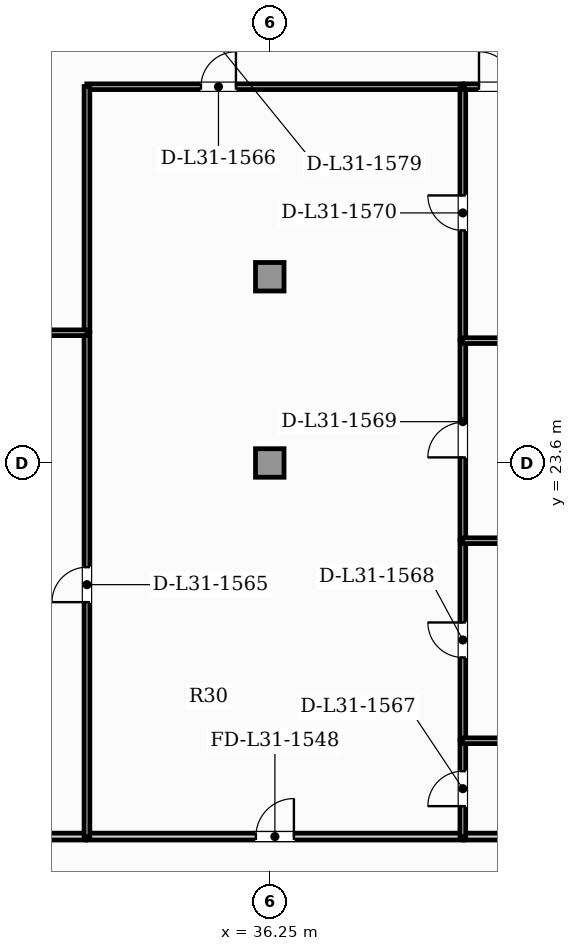
"""IFC4 building model, lengths in metres.
Left out: names, types, materials, properties, quantities, classifications, styles, units other than length and angle.
Written with IfcOpenShell. Run it as: python <this file> out.ifc"""

import sys

from ifc_helpers import new_model, si_unit, direction, frame, frame_2d, origin, origin_2d, place, context, subcontext, project, spatial, rectangle, extrude, element, fill, save


model = new_model("IFC4")
c1 = context("Model", 3, precision=1e-05, world=origin(), true_north=direction((0.0, 1.0)))
c2 = subcontext(c1, "Body", "Model", "MODEL_VIEW")
j1 = project(units=[si_unit("LENGTHUNIT", "METRE"), si_unit("PLANEANGLEUNIT", "RADIAN")], contexts=[c1])
p1 = place(None, origin())
s1 = spatial("IfcSite", under=j1, at=p1, CompositionType="ELEMENT")
p2 = place(p1, origin())
s2 = spatial("IfcBuilding", under=s1, at=p2, CompositionType="ELEMENT")
p3 = place(p2, frame((0.0, 0.0, 127.25)))
s3 = spatial("IfcBuildingStorey", under=s2, at=p3, CompositionType="ELEMENT", Elevation=127.25)
for number, where, z_axis, x_axis in (
    (1, (36.25, 23.6, 0.0), (0.0, 0.0, 1.0), (1.0, 0.0, 0.0)),
    (2, (36.25, 28.5, 0.0), (0.0, 0.0, 1.0), (1.0, 0.0, 0.0)),
):
    element("IfcColumn", number, at=place(p3, frame(where, z_axis=z_axis, x_axis=x_axis)), inside=s3, PredefinedType="COLUMN", context=c2, shape_type="SweptSolid", body=[
        extrude(rectangle(XDim=0.75, YDim=0.75, at=origin_2d()), origin(), (0.0, 0.0, 1.0), 3.85),
    ])
p4 = place(p3, frame((31.435, 13.77, 0.0), z_axis=(0.0, 0.0, 1.0), x_axis=(1.0, 0.0, 0.0)))
e3 = element("IfcWall", 3, at=p4, inside=s3, PredefinedType="PARTITIONING", context=c2, shape_type="SweptSolid", body=[
    extrude(rectangle(XDim=9.9, YDim=0.18, at=frame_2d((4.95, 0.0))), origin(), (0.0, 0.0, 1.0), 3.6),
])
p5 = place(p4, frame((4.45, 0.0, 0.0)))
e4 = element("IfcOpeningElement", 4, at=p5, cuts=e3, PredefinedType="OPENING", context=c2, shape_type="SweptSolid", body=[
    extrude(rectangle(XDim=1.0, YDim=2.15, at=frame_2d((0.5, 1.075))), frame((0.0, 0.1, 0.0), z_axis=(0.0, -1.0, 0.0), x_axis=(1.0, 0.0, 0.0)), (0.0, 0.0, 1.0), 0.2),
])
p6 = place(p3, frame((26.095, 13.77, 0.0), z_axis=(0.0, 0.0, 1.0), x_axis=(1.0, 0.0, 0.0)))
e5 = element("IfcWall", 5, at=p6, inside=s3, PredefinedType="PARTITIONING", context=c2, shape_type="SweptSolid", body=[
    extrude(rectangle(XDim=5.31, YDim=0.18, at=frame_2d((2.655, 0.0))), origin(), (0.0, 0.0, 1.0), 3.6),
])
p7 = place(p6, frame((2.155, 0.0, 0.0)))
e6 = element("IfcOpeningElement", 6, at=p7, cuts=e5, PredefinedType="OPENING", context=c2, shape_type="SweptSolid", body=[
    extrude(rectangle(XDim=1.0, YDim=2.15, at=frame_2d((0.5, 1.075))), frame((0.0, 0.1, 0.0), z_axis=(0.0, -1.0, 0.0), x_axis=(1.0, 0.0, 0.0)), (0.0, 0.0, 1.0), 0.2),
])
p8 = place(p3, frame((41.365, 13.77, 0.0), z_axis=(0.0, 0.0, 1.0), x_axis=(1.0, 0.0, 0.0)))
e7 = element("IfcWall", 7, at=p8, inside=s3, PredefinedType="PARTITIONING", context=c2, shape_type="SweptSolid", body=[
    extrude(rectangle(XDim=4.25, YDim=0.18, at=frame_2d((2.125, 0.0))), origin(), (0.0, 0.0, 1.0), 3.6),
])
p9 = place(p3, frame((31.44, 13.765, 0.0), z_axis=(0.0, 0.0, 1.0), x_axis=(0.0, 1.0, 0.0)))
e8 = element("IfcWall", 8, at=p9, inside=s3, PredefinedType="PARTITIONING", context=c2, shape_type="SweptSolid", body=[
    extrude(rectangle(XDim=13.267, YDim=0.15, at=frame_2d((6.634, 0.0))), origin(), (0.0, 0.0, 1.0), 3.6),
])
p10 = place(p9, frame((6.173, 0.0, 0.0)))
e9 = element("IfcOpeningElement", 9, at=p10, cuts=e8, PredefinedType="OPENING", context=c2, shape_type="SweptSolid", body=[
    extrude(rectangle(XDim=0.92, YDim=2.1, at=frame_2d((0.46, 1.05))), frame((0.0, 0.085, 0.0), z_axis=(0.0, -1.0, 0.0), x_axis=(1.0, 0.0, 0.0)), (0.0, 0.0, 1.0), 0.17),
])
p11 = place(p3, frame((31.435, 33.5, 0.0), z_axis=(0.0, 0.0, 1.0), x_axis=(1.0, 0.0, 0.0)))
e10 = element("IfcWall", 10, at=p11, inside=s3, PredefinedType="PARTITIONING", context=c2, shape_type="SweptSolid", body=[
    extrude(rectangle(XDim=9.9, YDim=0.15, at=frame_2d((4.95, 0.0))), origin(), (0.0, 0.0, 1.0), 3.6),
])
p12 = place(p11, frame((3.005, 0.0, 0.0)))
e11 = element("IfcOpeningElement", 11, at=p12, cuts=e10, PredefinedType="OPENING", context=c2, shape_type="SweptSolid", body=[
    extrude(rectangle(XDim=0.92, YDim=2.1, at=frame_2d((0.46, 1.05))), frame((0.0, 0.085, 0.0), z_axis=(0.0, -1.0, 0.0), x_axis=(1.0, 0.0, 0.0)), (0.0, 0.0, 1.0), 0.17),
])
p13 = place(p3, frame((31.44, 27.062, 0.0), z_axis=(0.0, 0.0, 1.0), x_axis=(0.0, 1.0, 0.0)))
e12 = element("IfcWall", 12, at=p13, inside=s3, PredefinedType="PARTITIONING", context=c2, shape_type="SweptSolid", body=[
    extrude(rectangle(XDim=6.443, YDim=0.15, at=frame_2d((3.221, 0.0))), origin(), (0.0, 0.0, 1.0), 3.6),
])
p14 = place(p3, frame((41.33, 13.765, 0.0), z_axis=(0.0, 0.0, 1.0), x_axis=(0.0, 1.0, 0.0)))
e13 = element("IfcWall", 13, at=p14, inside=s3, PredefinedType="PARTITIONING", context=c2, shape_type="SweptSolid", body=[
    extrude(rectangle(XDim=2.531, YDim=0.15, at=frame_2d((1.266, 0.0))), origin(), (0.0, 0.0, 1.0), 3.6),
])
p15 = place(p14, frame((0.806, 0.0, 0.0)))
e14 = element("IfcOpeningElement", 14, at=p15, cuts=e13, PredefinedType="OPENING", context=c2, shape_type="SweptSolid", body=[
    extrude(rectangle(XDim=0.92, YDim=2.1, at=frame_2d((0.46, 1.05))), frame((0.0, 0.085, 0.0), z_axis=(0.0, -1.0, 0.0), x_axis=(1.0, 0.0, 0.0)), (0.0, 0.0, 1.0), 0.17),
])
p16 = place(p3, frame((41.33, 16.326, 0.0), z_axis=(0.0, 0.0, 1.0), x_axis=(0.0, 1.0, 0.0)))
e15 = element("IfcWall", 15, at=p16, inside=s3, PredefinedType="PARTITIONING", context=c2, shape_type="SweptSolid", body=[
    extrude(rectangle(XDim=5.234, YDim=0.15, at=frame_2d((2.617, 0.0))), origin(), (0.0, 0.0, 1.0), 3.6),
])
p17 = place(p16, frame((2.157, 0.0, 0.0)))
e16 = element("IfcOpeningElement", 16, at=p17, cuts=e15, PredefinedType="OPENING", context=c2, shape_type="SweptSolid", body=[
    extrude(rectangle(XDim=0.92, YDim=2.1, at=frame_2d((0.46, 1.05))), frame((0.0, 0.085, 0.0), z_axis=(0.0, -1.0, 0.0), x_axis=(1.0, 0.0, 0.0)), (0.0, 0.0, 1.0), 0.17),
])
p18 = place(p3, frame((41.33, 21.59, 0.0), z_axis=(0.0, 0.0, 1.0), x_axis=(0.0, 1.0, 0.0)))
e17 = element("IfcWall", 17, at=p18, inside=s3, PredefinedType="PARTITIONING", context=c2, shape_type="SweptSolid", body=[
    extrude(rectangle(XDim=5.234, YDim=0.15, at=frame_2d((2.617, 0.0))), origin(), (0.0, 0.0, 1.0), 3.6),
])
p19 = place(p18, frame((2.157, 0.0, 0.0)))
e18 = element("IfcOpeningElement", 18, at=p19, cuts=e17, PredefinedType="OPENING", context=c2, shape_type="SweptSolid", body=[
    extrude(rectangle(XDim=0.92, YDim=2.1, at=frame_2d((0.46, 1.05))), frame((0.0, 0.085, 0.0), z_axis=(0.0, -1.0, 0.0), x_axis=(1.0, 0.0, 0.0)), (0.0, 0.0, 1.0), 0.17),
])
p20 = place(p3, frame((41.33, 26.854, 0.0), z_axis=(0.0, 0.0, 1.0), x_axis=(0.0, 1.0, 0.0)))
e19 = element("IfcWall", 19, at=p20, inside=s3, PredefinedType="PARTITIONING", context=c2, shape_type="SweptSolid", body=[
    extrude(rectangle(XDim=6.651, YDim=0.15, at=frame_2d((3.325, 0.0))), origin(), (0.0, 0.0, 1.0), 3.6),
])
p21 = place(p20, frame((2.865, 0.0, 0.0)))
e20 = element("IfcOpeningElement", 20, at=p21, cuts=e19, PredefinedType="OPENING", context=c2, shape_type="SweptSolid", body=[
    extrude(rectangle(XDim=0.92, YDim=2.1, at=frame_2d((0.46, 1.05))), frame((0.0, 0.085, 0.0), z_axis=(0.0, -1.0, 0.0), x_axis=(1.0, 0.0, 0.0)), (0.0, 0.0, 1.0), 0.17),
])
p22 = place(p3, frame((26.055, 27.027, 0.0), z_axis=(0.0, 0.0, 1.0), x_axis=(1.0, 0.0, 0.0)))
e21 = element("IfcWall", 21, at=p22, inside=s3, PredefinedType="PARTITIONING", context=c2, shape_type="SweptSolid", body=[
    extrude(rectangle(XDim=5.39, YDim=0.15, at=frame_2d((2.695, 0.0))), origin(), (0.0, 0.0, 1.0), 3.6),
])
p23 = place(p22, frame((0.618, 0.0, 0.0)))
e22 = element("IfcOpeningElement", 22, at=p23, cuts=e21, PredefinedType="OPENING", context=c2, shape_type="SweptSolid", body=[
    extrude(rectangle(XDim=0.92, YDim=2.1, at=frame_2d((0.46, 1.05))), frame((0.0, 0.085, 0.0), z_axis=(0.0, -1.0, 0.0), x_axis=(1.0, 0.0, 0.0)), (0.0, 0.0, 1.0), 0.17),
])
p24 = place(p3, frame((41.365, 33.5, 0.0), z_axis=(0.0, 0.0, 1.0), x_axis=(1.0, 0.0, 0.0)))
e23 = element("IfcWall", 23, at=p24, inside=s3, PredefinedType="PARTITIONING", context=c2, shape_type="SweptSolid", body=[
    extrude(rectangle(XDim=4.25, YDim=0.15, at=frame_2d((2.125, 0.0))), origin(), (0.0, 0.0, 1.0), 3.6),
])
p25 = place(p24, frame((0.39, 0.0, 0.0)))
e24 = element("IfcOpeningElement", 24, at=p25, cuts=e23, PredefinedType="OPENING", context=c2, shape_type="SweptSolid", body=[
    extrude(rectangle(XDim=0.92, YDim=2.1, at=frame_2d((0.46, 1.05))), frame((0.0, 0.085, 0.0), z_axis=(0.0, -1.0, 0.0), x_axis=(1.0, 0.0, 0.0)), (0.0, 0.0, 1.0), 0.17),
])
for number, where, z_axis, x_axis in (
    (25, (41.325, 16.292, 0.0), (0.0, 0.0, 1.0), (1.0, 0.0, 0.0)),
    (26, (41.325, 21.555, 0.0), (0.0, 0.0, 1.0), (1.0, 0.0, 0.0)),
    (27, (41.325, 26.819, 0.0), (0.0, 0.0, 1.0), (1.0, 0.0, 0.0)),
):
    element("IfcWall", number, at=place(p3, frame(where, z_axis=z_axis, x_axis=x_axis)), inside=s3, PredefinedType="PARTITIONING", context=c2, shape_type="SweptSolid", body=[
        extrude(rectangle(XDim=4.29, YDim=0.15, at=frame_2d((2.145, 0.0))), origin(), (0.0, 0.0, 1.0), 3.6),
    ])
p26 = place(p5, origin())
e28 = element("IfcDoor", 28, at=p26, inside=s3, OperationType="SINGLE_SWING_RIGHT", PredefinedType="DOOR", context=c2, shape_type="SweptSolid", body=[
    extrude(rectangle(XDim=1.0, YDim=2.15, at=frame_2d((0.5, 1.075))), frame((0.0, 0.025, 0.0), z_axis=(0.0, -1.0, 0.0), x_axis=(1.0, 0.0, 0.0)), (0.0, 0.0, 1.0), 0.05),
])
fill(e4, e28)
p27 = place(p10, origin())
e29 = element("IfcDoor", 29, at=p27, inside=s3, OperationType="SINGLE_SWING_LEFT", PredefinedType="DOOR", context=c2, shape_type="SweptSolid", body=[
    extrude(rectangle(XDim=0.92, YDim=2.1, at=frame_2d((0.46, 1.05))), frame((0.0, 0.025, 0.0), z_axis=(0.0, -1.0, 0.0), x_axis=(1.0, 0.0, 0.0)), (0.0, 0.0, 1.0), 0.05),
])
fill(e9, e29)
p28 = place(p12, origin())
e30 = element("IfcDoor", 30, at=p28, inside=s3, OperationType="SINGLE_SWING_RIGHT", PredefinedType="DOOR", context=c2, shape_type="SweptSolid", body=[
    extrude(rectangle(XDim=0.92, YDim=2.1, at=frame_2d((0.46, 1.05))), frame((0.0, 0.025, 0.0), z_axis=(0.0, -1.0, 0.0), x_axis=(1.0, 0.0, 0.0)), (0.0, 0.0, 1.0), 0.05),
])
fill(e11, e30)
p29 = place(p15, origin())
e31 = element("IfcDoor", 31, at=p29, inside=s3, OperationType="SINGLE_SWING_LEFT", PredefinedType="DOOR", context=c2, shape_type="SweptSolid", body=[
    extrude(rectangle(XDim=0.92, YDim=2.1, at=frame_2d((0.46, 1.05))), frame((0.0, 0.025, 0.0), z_axis=(0.0, -1.0, 0.0), x_axis=(1.0, 0.0, 0.0)), (0.0, 0.0, 1.0), 0.05),
])
fill(e14, e31)
p30 = place(p17, origin())
e32 = element("IfcDoor", 32, at=p30, inside=s3, OperationType="SINGLE_SWING_RIGHT", PredefinedType="DOOR", context=c2, shape_type="SweptSolid", body=[
    extrude(rectangle(XDim=0.92, YDim=2.1, at=frame_2d((0.46, 1.05))), frame((0.0, 0.025, 0.0), z_axis=(0.0, -1.0, 0.0), x_axis=(1.0, 0.0, 0.0)), (0.0, 0.0, 1.0), 0.05),
])
fill(e16, e32)
p31 = place(p19, origin())
e33 = element("IfcDoor", 33, at=p31, inside=s3, OperationType="SINGLE_SWING_LEFT", PredefinedType="DOOR", context=c2, shape_type="SweptSolid", body=[
    extrude(rectangle(XDim=0.92, YDim=2.1, at=frame_2d((0.46, 1.05))), frame((0.0, 0.025, 0.0), z_axis=(0.0, -1.0, 0.0), x_axis=(1.0, 0.0, 0.0)), (0.0, 0.0, 1.0), 0.05),
])
fill(e18, e33)
p32 = place(p21, origin())
e34 = element("IfcDoor", 34, at=p32, inside=s3, OperationType="SINGLE_SWING_RIGHT", PredefinedType="DOOR", context=c2, shape_type="SweptSolid", body=[
    extrude(rectangle(XDim=0.92, YDim=2.1, at=frame_2d((0.46, 1.05))), frame((0.0, 0.025, 0.0), z_axis=(0.0, -1.0, 0.0), x_axis=(1.0, 0.0, 0.0)), (0.0, 0.0, 1.0), 0.05),
])
fill(e20, e34)
p33 = place(p25, origin())
e35 = element("IfcDoor", 35, at=p33, inside=s3, OperationType="SINGLE_SWING_LEFT", PredefinedType="DOOR", context=c2, shape_type="SweptSolid", body=[
    extrude(rectangle(XDim=0.92, YDim=2.1, at=frame_2d((0.46, 1.05))), frame((0.0, 0.025, 0.0), z_axis=(0.0, -1.0, 0.0), x_axis=(1.0, 0.0, 0.0)), (0.0, 0.0, 1.0), 0.05),
])
fill(e24, e35)
save(model, sys.argv[1])
